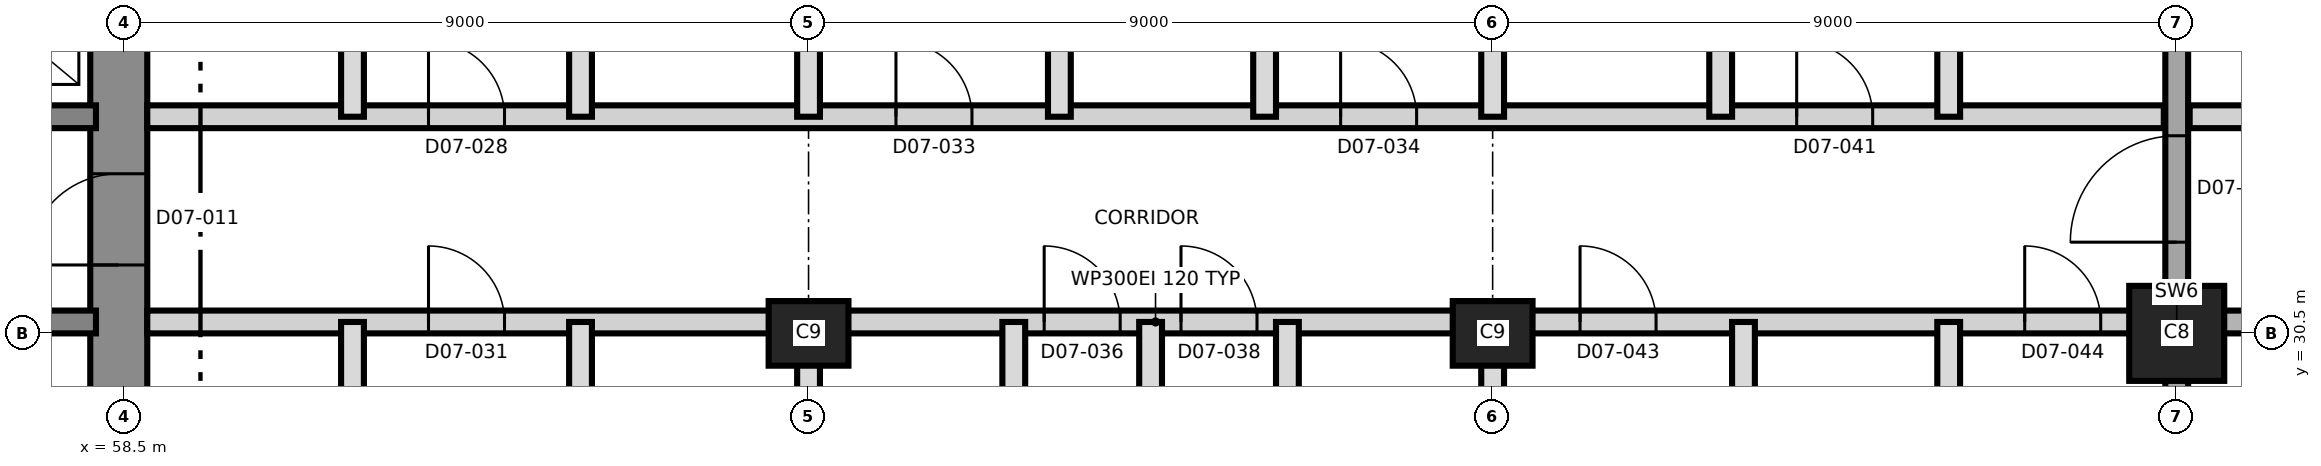
"""IFC4 building model, lengths in metres.
Left out: names, types, materials, properties, quantities, classifications, styles, units other than length and angle.
Written with IfcOpenShell. Run it as: python <this file> out.ifc"""

import sys

from ifc_helpers import new_model, si_unit, direction, frame, frame_2d, origin, origin_2d, place, context, subcontext, project, spatial, rectangle, extrude, element, fill, save


model = new_model("IFC4")
c1 = context("Model", 3, precision=1e-05, world=origin(), true_north=direction((0.0, 1.0)))
c2 = subcontext(c1, "Body", "Model", "MODEL_VIEW")
j1 = project(units=[si_unit("LENGTHUNIT", "METRE"), si_unit("PLANEANGLEUNIT", "RADIAN")], contexts=[c1])
p1 = place(None, origin())
s1 = spatial("IfcSite", under=j1, at=p1, CompositionType="ELEMENT")
p2 = place(p1, origin())
s2 = spatial("IfcBuilding", under=s1, at=p2, CompositionType="ELEMENT")
p3 = place(p2, frame((0.0, 0.0, 90.8)))
s3 = spatial("IfcBuildingStorey", under=s2, at=p3, CompositionType="ELEMENT", Elevation=90.8)
p4 = place(p3, frame((58.425, 21.125, 0.0), z_axis=(0.0, 0.0, 1.0), x_axis=(0.0, 1.0, 0.0)))
e1 = element("IfcWall", 1, at=p4, inside=s3, PredefinedType="SHEAR", context=c2, shape_type="SweptSolid", body=[
    extrude(rectangle(XDim=18.75, YDim=0.75, at=frame_2d((9.375, 0.0))), origin(), (0.0, 0.0, 1.0), 3.7),
])
p5 = place(p4, frame((10.275, 0.0, 0.0)))
e2 = element("IfcOpeningElement", 2, at=p5, cuts=e1, PredefinedType="OPENING", context=c2, shape_type="SweptSolid", body=[
    extrude(rectangle(XDim=1.2, YDim=2.1, at=frame_2d((0.6, 1.05))), frame((0.0, 0.385, 0.0), z_axis=(0.0, -1.0, 0.0), x_axis=(1.0, 0.0, 0.0)), (0.0, 0.0, 1.0), 0.77),
])
p6 = place(p3, frame((31.875, 30.65, 0.0), z_axis=(0.0, 0.0, 1.0), x_axis=(1.0, 0.0, 0.0)))
e3 = element("IfcWall", 3, at=p6, inside=s3, PredefinedType="SHEAR", context=c2, shape_type="SweptSolid", body=[
    extrude(rectangle(XDim=26.25, YDim=0.3, at=frame_2d((13.125, 0.0))), origin(), (0.0, 0.0, 1.0), 3.7),
])
p7 = place(p6, frame((24.625, 0.0, 0.0)))
e4 = element("IfcOpeningElement", 4, at=p7, cuts=e3, PredefinedType="OPENING", context=c2, shape_type="SweptSolid", body=[
    extrude(rectangle(XDim=1.0, YDim=2.1, at=frame_2d((0.5, 1.05))), frame((0.0, 0.16, 0.0), z_axis=(0.0, -1.0, 0.0), x_axis=(1.0, 0.0, 0.0)), (0.0, 0.0, 1.0), 0.32),
])
p8 = place(p6, frame((11.425, 0.0, 0.0)))
e5 = element("IfcOpeningElement", 5, at=p8, cuts=e3, PredefinedType="OPENING", context=c2, shape_type="SweptSolid", body=[
    extrude(rectangle(XDim=1.0, YDim=2.1, at=frame_2d((0.5, 1.05))), frame((0.0, 0.16, 0.0), z_axis=(0.0, -1.0, 0.0), x_axis=(1.0, 0.0, 0.0)), (0.0, 0.0, 1.0), 0.32),
])
p9 = place(p3, frame((31.875, 33.35, 0.0), z_axis=(0.0, 0.0, 1.0), x_axis=(1.0, 0.0, 0.0)))
e6 = element("IfcWall", 6, at=p9, inside=s3, PredefinedType="SHEAR", context=c2, shape_type="SweptSolid", body=[
    extrude(rectangle(XDim=26.25, YDim=0.3, at=frame_2d((13.125, 0.0))), origin(), (0.0, 0.0, 1.0), 3.7),
])
p10 = place(p9, frame((13.775, 0.0, 0.0)))
e7 = element("IfcOpeningElement", 7, at=p10, cuts=e6, PredefinedType="OPENING", context=c2, shape_type="SweptSolid", body=[
    extrude(rectangle(XDim=1.4, YDim=2.1, at=frame_2d((0.7, 1.05))), frame((0.0, 0.16, 0.0), z_axis=(0.0, -1.0, 0.0), x_axis=(1.0, 0.0, 0.0)), (0.0, 0.0, 1.0), 0.32),
])
p11 = place(p9, frame((5.25, 0.0, 0.0)))
e8 = element("IfcOpeningElement", 8, at=p11, cuts=e6, PredefinedType="OPENING", context=c2, shape_type="SweptSolid", body=[
    extrude(rectangle(XDim=1.2, YDim=2.1, at=frame_2d((0.6, 1.05))), frame((0.0, 0.16, 0.0), z_axis=(0.0, -1.0, 0.0), x_axis=(1.0, 0.0, 0.0)), (0.0, 0.0, 1.0), 0.32),
])
p12 = place(p9, frame((19.8, 0.0, 0.0)))
e9 = element("IfcOpeningElement", 9, at=p12, cuts=e6, PredefinedType="OPENING", context=c2, shape_type="SweptSolid", body=[
    extrude(rectangle(XDim=1.2, YDim=2.1, at=frame_2d((0.6, 1.05))), frame((0.0, 0.16, 0.0), z_axis=(0.0, -1.0, 0.0), x_axis=(1.0, 0.0, 0.0)), (0.0, 0.0, 1.0), 0.32),
])
for number, where, z_axis, x_axis in (
    (10, (67.5, 30.5, 0.0), (0.0, 0.0, 1.0), (1.0, 0.0, 0.0)),
    (11, (76.5, 30.5, 0.0), (0.0, 0.0, 1.0), (1.0, 0.0, 0.0)),
):
    element("IfcColumn", number, at=place(p3, frame(where, z_axis=z_axis, x_axis=x_axis)), inside=s3, PredefinedType="COLUMN", context=c2, shape_type="SweptSolid", body=[
        extrude(rectangle(XDim=1.05, YDim=0.85, at=origin_2d()), origin(), (0.0, 0.0, 1.0), 3.7),
    ])
p13 = place(p3, frame((85.5, 30.5, 0.0), z_axis=(0.0, 0.0, 1.0), x_axis=(1.0, 0.0, 0.0)))
e12 = element("IfcColumn", 12, at=p13, inside=s3, PredefinedType="COLUMN", context=c2, shape_type="SweptSolid", body=[
    extrude(rectangle(XDim=1.25, YDim=1.25, at=origin_2d()), origin(), (0.0, 0.0, 1.0), 3.7),
])
p14 = place(p3, frame((85.5, 20.995, 0.0), z_axis=(0.0, 0.0, 1.0), x_axis=(0.0, 1.0, 0.0)))
e13 = element("IfcWall", 13, at=p14, inside=s3, PredefinedType="SHEAR", context=c2, shape_type="SweptSolid", body=[
    extrude(rectangle(XDim=19.01, YDim=0.3, at=frame_2d((9.505, 0.0))), origin(), (0.0, 0.0, 1.0), 3.7),
])
p15 = place(p14, frame((10.705, 0.0, 0.0)))
e14 = element("IfcOpeningElement", 14, at=p15, cuts=e13, PredefinedType="OPENING", context=c2, shape_type="SweptSolid", body=[
    extrude(rectangle(XDim=1.4, YDim=2.1, at=frame_2d((0.7, 1.05))), frame((0.0, 0.16, 0.0), z_axis=(0.0, -1.0, 0.0), x_axis=(1.0, 0.0, 0.0)), (0.0, 0.0, 1.0), 0.32),
])
p16 = place(p3, frame((58.8, 30.65, 0.0), z_axis=(0.0, 0.0, 1.0), x_axis=(1.0, 0.0, 0.0)))
e15 = element("IfcWall", 15, at=p16, inside=s3, PredefinedType="PARTITIONING", context=c2, shape_type="SweptSolid", body=[
    extrude(rectangle(XDim=26.53, YDim=0.3, at=frame_2d((13.265, 0.0))), origin(), (0.0, 0.0, 1.0), 3.4),
])
p17 = place(p16, frame((3.7, 0.0, 0.0)))
e16 = element("IfcOpeningElement", 16, at=p17, cuts=e15, PredefinedType="OPENING", context=c2, shape_type="SweptSolid", body=[
    extrude(rectangle(XDim=1.0, YDim=2.4, at=frame_2d((0.5, 1.2))), frame((0.0, 0.16, 0.0), z_axis=(0.0, -1.0, 0.0), x_axis=(1.0, 0.0, 0.0)), (0.0, 0.0, 1.0), 0.32),
])
p18 = place(p16, frame((11.8, 0.0, 0.0)))
e17 = element("IfcOpeningElement", 17, at=p18, cuts=e15, PredefinedType="OPENING", context=c2, shape_type="SweptSolid", body=[
    extrude(rectangle(XDim=1.0, YDim=2.1, at=frame_2d((0.5, 1.05))), frame((0.0, 0.16, 0.0), z_axis=(0.0, -1.0, 0.0), x_axis=(1.0, 0.0, 0.0)), (0.0, 0.0, 1.0), 0.32),
])
p19 = place(p16, frame((13.6, 0.0, 0.0)))
e18 = element("IfcOpeningElement", 18, at=p19, cuts=e15, PredefinedType="OPENING", context=c2, shape_type="SweptSolid", body=[
    extrude(rectangle(XDim=1.0, YDim=2.1, at=frame_2d((0.5, 1.05))), frame((0.0, 0.16, 0.0), z_axis=(0.0, -1.0, 0.0), x_axis=(1.0, 0.0, 0.0)), (0.0, 0.0, 1.0), 0.32),
])
p20 = place(p16, frame((18.85, 0.0, 0.0)))
e19 = element("IfcOpeningElement", 19, at=p20, cuts=e15, PredefinedType="OPENING", context=c2, shape_type="SweptSolid", body=[
    extrude(rectangle(XDim=1.0, YDim=2.1, at=frame_2d((0.5, 1.05))), frame((0.0, 0.16, 0.0), z_axis=(0.0, -1.0, 0.0), x_axis=(1.0, 0.0, 0.0)), (0.0, 0.0, 1.0), 0.32),
])
p21 = place(p16, frame((24.7, 0.0, 0.0)))
e20 = element("IfcOpeningElement", 20, at=p21, cuts=e15, PredefinedType="OPENING", context=c2, shape_type="SweptSolid", body=[
    extrude(rectangle(XDim=1.0, YDim=2.1, at=frame_2d((0.5, 1.05))), frame((0.0, 0.16, 0.0), z_axis=(0.0, -1.0, 0.0), x_axis=(1.0, 0.0, 0.0)), (0.0, 0.0, 1.0), 0.32),
])
p22 = place(p3, frame((85.67, 30.65, 0.0), z_axis=(0.0, 0.0, 1.0), x_axis=(1.0, 0.0, 0.0)))
e21 = element("IfcWall", 21, at=p22, inside=s3, PredefinedType="SHEAR", context=c2, shape_type="SweptSolid", body=[
    extrude(rectangle(XDim=9.335, YDim=0.3, at=frame_2d((4.667, 0.0))), origin(), (0.0, 0.0, 1.0), 3.4),
])
p23 = place(p22, frame((2.08, 0.0, 0.0)))
e22 = element("IfcOpeningElement", 22, at=p23, cuts=e21, PredefinedType="OPENING", context=c2, shape_type="SweptSolid", body=[
    extrude(rectangle(XDim=1.2, YDim=2.1, at=frame_2d((0.6, 1.05))), frame((0.0, 0.16, 0.0), z_axis=(0.0, -1.0, 0.0), x_axis=(1.0, 0.0, 0.0)), (0.0, 0.0, 1.0), 0.32),
])
p24 = place(p22, frame((5.63, 0.0, 0.0)))
e23 = element("IfcOpeningElement", 23, at=p24, cuts=e21, PredefinedType="OPENING", context=c2, shape_type="SweptSolid", body=[
    extrude(rectangle(XDim=1.0, YDim=2.1, at=frame_2d((0.5, 1.05))), frame((0.0, 0.16, 0.0), z_axis=(0.0, -1.0, 0.0), x_axis=(1.0, 0.0, 0.0)), (0.0, 0.0, 1.0), 0.32),
])
p25 = place(p3, frame((58.8, 33.35, 0.0), z_axis=(0.0, 0.0, 1.0), x_axis=(1.0, 0.0, 0.0)))
e24 = element("IfcWall", 24, at=p25, inside=s3, PredefinedType="PARTITIONING", context=c2, shape_type="SweptSolid", body=[
    extrude(rectangle(XDim=26.53, YDim=0.3, at=frame_2d((13.265, 0.0))), origin(), (0.0, 0.0, 1.0), 3.4),
])
p26 = place(p25, frame((3.7, 0.0, 0.0)))
e25 = element("IfcOpeningElement", 25, at=p26, cuts=e24, PredefinedType="OPENING", context=c2, shape_type="SweptSolid", body=[
    extrude(rectangle(XDim=1.0, YDim=2.4, at=frame_2d((0.5, 1.2))), frame((0.0, 0.16, 0.0), z_axis=(0.0, -1.0, 0.0), x_axis=(1.0, 0.0, 0.0)), (0.0, 0.0, 1.0), 0.32),
])
p27 = place(p25, frame((9.85, 0.0, 0.0)))
e26 = element("IfcOpeningElement", 26, at=p27, cuts=e24, PredefinedType="OPENING", context=c2, shape_type="SweptSolid", body=[
    extrude(rectangle(XDim=1.0, YDim=2.1, at=frame_2d((0.5, 1.05))), frame((0.0, 0.16, 0.0), z_axis=(0.0, -1.0, 0.0), x_axis=(1.0, 0.0, 0.0)), (0.0, 0.0, 1.0), 0.32),
])
p28 = place(p25, frame((15.7, 0.0, 0.0)))
e27 = element("IfcOpeningElement", 27, at=p28, cuts=e24, PredefinedType="OPENING", context=c2, shape_type="SweptSolid", body=[
    extrude(rectangle(XDim=1.0, YDim=2.1, at=frame_2d((0.5, 1.05))), frame((0.0, 0.16, 0.0), z_axis=(0.0, -1.0, 0.0), x_axis=(1.0, 0.0, 0.0)), (0.0, 0.0, 1.0), 0.32),
])
p29 = place(p25, frame((21.7, 0.0, 0.0)))
e28 = element("IfcOpeningElement", 28, at=p29, cuts=e24, PredefinedType="OPENING", context=c2, shape_type="SweptSolid", body=[
    extrude(rectangle(XDim=1.0, YDim=2.4, at=frame_2d((0.5, 1.2))), frame((0.0, 0.16, 0.0), z_axis=(0.0, -1.0, 0.0), x_axis=(1.0, 0.0, 0.0)), (0.0, 0.0, 1.0), 0.32),
])
p30 = place(p3, frame((85.67, 33.35, 0.0), z_axis=(0.0, 0.0, 1.0), x_axis=(1.0, 0.0, 0.0)))
e29 = element("IfcWall", 29, at=p30, inside=s3, PredefinedType="PARTITIONING", context=c2, shape_type="SweptSolid", body=[
    extrude(rectangle(XDim=9.237, YDim=0.3, at=frame_2d((4.619, 0.0))), origin(), (0.0, 0.0, 1.0), 3.4),
])
p31 = place(p30, frame((1.83, 0.0, 0.0)))
e30 = element("IfcOpeningElement", 30, at=p31, cuts=e29, PredefinedType="OPENING", context=c2, shape_type="SweptSolid", body=[
    extrude(rectangle(XDim=1.0, YDim=2.1, at=frame_2d((0.5, 1.05))), frame((0.0, 0.16, 0.0), z_axis=(0.0, -1.0, 0.0), x_axis=(1.0, 0.0, 0.0)), (0.0, 0.0, 1.0), 0.32),
])
p32 = place(p30, frame((5.63, 0.0, 0.0)))
e31 = element("IfcOpeningElement", 31, at=p32, cuts=e29, PredefinedType="OPENING", context=c2, shape_type="SweptSolid", body=[
    extrude(rectangle(XDim=1.0, YDim=2.1, at=frame_2d((0.5, 1.05))), frame((0.0, 0.16, 0.0), z_axis=(0.0, -1.0, 0.0), x_axis=(1.0, 0.0, 0.0)), (0.0, 0.0, 1.0), 0.32),
])
for number, where, z_axis, x_axis in (
    (32, (61.5, 27.35, 0.0), (0.0, 0.0, 1.0), (0.0, 1.0, 0.0)),
    (33, (61.5, 33.35, 0.0), (0.0, 0.0, 1.0), (0.0, 1.0, 0.0)),
    (34, (64.5, 27.35, 0.0), (0.0, 0.0, 1.0), (0.0, 1.0, 0.0)),
    (35, (64.5, 33.35, 0.0), (0.0, 0.0, 1.0), (0.0, 1.0, 0.0)),
):
    element("IfcWall", number, at=place(p3, frame(where, z_axis=z_axis, x_axis=x_axis)), inside=s3, PredefinedType="PARTITIONING", context=c2, shape_type="SweptSolid", body=[
        extrude(rectangle(XDim=3.3, YDim=0.3, at=frame_2d((1.65, 0.0))), origin(), (0.0, 0.0, 1.0), 3.4),
    ])
p33 = place(p3, frame((67.5, 20.995, 0.0), z_axis=(0.0, 0.0, 1.0), x_axis=(0.0, 1.0, 0.0)))
e36 = element("IfcWall", 36, at=p33, inside=s3, PredefinedType="PARTITIONING", context=c2, shape_type="SweptSolid", body=[
    extrude(rectangle(XDim=9.655, YDim=0.3, at=frame_2d((4.827, 0.0))), origin(), (0.0, 0.0, 1.0), 3.4),
])
p34 = place(p3, frame((67.5, 33.35, 0.0), z_axis=(0.0, 0.0, 1.0), x_axis=(0.0, 1.0, 0.0)))
e37 = element("IfcWall", 37, at=p34, inside=s3, PredefinedType="PARTITIONING", context=c2, shape_type="SweptSolid", body=[
    extrude(rectangle(XDim=6.655, YDim=0.3, at=frame_2d((3.327, 0.0))), origin(), (0.0, 0.0, 1.0), 3.4),
])
for number, where, z_axis, x_axis in (
    (38, (70.2, 27.45, 0.0), (0.0, 0.0, 1.0), (0.0, 1.0, 0.0)),
    (39, (70.8, 33.35, 0.0), (0.0, 0.0, 1.0), (0.0, 1.0, 0.0)),
):
    element("IfcWall", number, at=place(p3, frame(where, z_axis=z_axis, x_axis=x_axis)), inside=s3, PredefinedType="PARTITIONING", context=c2, shape_type="SweptSolid", body=[
        extrude(rectangle(XDim=3.2, YDim=0.3, at=frame_2d((1.6, 0.0))), origin(), (0.0, 0.0, 1.0), 3.4),
    ])
p35 = place(p3, frame((72.0, 20.995, 0.0), z_axis=(0.0, 0.0, 1.0), x_axis=(0.0, 1.0, 0.0)))
e40 = element("IfcWall", 40, at=p35, inside=s3, PredefinedType="PARTITIONING", context=c2, shape_type="SweptSolid", body=[
    extrude(rectangle(XDim=9.655, YDim=0.3, at=frame_2d((4.827, 0.0))), origin(), (0.0, 0.0, 1.0), 3.4),
])
p36 = place(p3, frame((73.5, 33.35, 0.0), z_axis=(0.0, 0.0, 1.0), x_axis=(0.0, 1.0, 0.0)))
e41 = element("IfcWall", 41, at=p36, inside=s3, PredefinedType="PARTITIONING", context=c2, shape_type="SweptSolid", body=[
    extrude(rectangle(XDim=6.795, YDim=0.3, at=frame_2d((3.397, 0.0))), origin(), (0.0, 0.0, 1.0), 3.4),
])
p37 = place(p3, frame((73.8, 27.45, 0.0), z_axis=(0.0, 0.0, 1.0), x_axis=(0.0, 1.0, 0.0)))
e42 = element("IfcWall", 42, at=p37, inside=s3, PredefinedType="PARTITIONING", context=c2, shape_type="SweptSolid", body=[
    extrude(rectangle(XDim=3.2, YDim=0.3, at=frame_2d((1.6, 0.0))), origin(), (0.0, 0.0, 1.0), 3.4),
])
p38 = place(p3, frame((76.5, 20.995, 0.0), z_axis=(0.0, 0.0, 1.0), x_axis=(0.0, 1.0, 0.0)))
e43 = element("IfcWall", 43, at=p38, inside=s3, PredefinedType="PARTITIONING", context=c2, shape_type="SweptSolid", body=[
    extrude(rectangle(XDim=9.655, YDim=0.3, at=frame_2d((4.827, 0.0))), origin(), (0.0, 0.0, 1.0), 3.4),
])
p39 = place(p3, frame((76.5, 33.35, 0.0), z_axis=(0.0, 0.0, 1.0), x_axis=(0.0, 1.0, 0.0)))
e44 = element("IfcWall", 44, at=p39, inside=s3, PredefinedType="PARTITIONING", context=c2, shape_type="SweptSolid", body=[
    extrude(rectangle(XDim=6.655, YDim=0.3, at=frame_2d((3.327, 0.0))), origin(), (0.0, 0.0, 1.0), 3.4),
])
p40 = place(p3, frame((79.5, 33.35, 0.0), z_axis=(0.0, 0.0, 1.0), x_axis=(0.0, 1.0, 0.0)))
e45 = element("IfcWall", 45, at=p40, inside=s3, PredefinedType="PARTITIONING", context=c2, shape_type="SweptSolid", body=[
    extrude(rectangle(XDim=3.3, YDim=0.3, at=frame_2d((1.65, 0.0))), origin(), (0.0, 0.0, 1.0), 3.4),
])
p41 = place(p3, frame((79.8, 27.45, 0.0), z_axis=(0.0, 0.0, 1.0), x_axis=(0.0, 1.0, 0.0)))
e46 = element("IfcWall", 46, at=p41, inside=s3, PredefinedType="PARTITIONING", context=c2, shape_type="SweptSolid", body=[
    extrude(rectangle(XDim=3.2, YDim=0.3, at=frame_2d((1.6, 0.0))), origin(), (0.0, 0.0, 1.0), 3.4),
])
p42 = place(p3, frame((82.5, 20.995, 0.0), z_axis=(0.0, 0.0, 1.0), x_axis=(0.0, 1.0, 0.0)))
e47 = element("IfcWall", 47, at=p42, inside=s3, PredefinedType="PARTITIONING", context=c2, shape_type="SweptSolid", body=[
    extrude(rectangle(XDim=9.655, YDim=0.3, at=frame_2d((4.827, 0.0))), origin(), (0.0, 0.0, 1.0), 3.4),
])
p43 = place(p3, frame((82.5, 33.35, 0.0), z_axis=(0.0, 0.0, 1.0), x_axis=(0.0, 1.0, 0.0)))
e48 = element("IfcWall", 48, at=p43, inside=s3, PredefinedType="PARTITIONING", context=c2, shape_type="SweptSolid", body=[
    extrude(rectangle(XDim=3.3, YDim=0.3, at=frame_2d((1.65, 0.0))), origin(), (0.0, 0.0, 1.0), 3.4),
])
p44 = place(p5, origin())
e49 = element("IfcDoor", 49, at=p44, inside=s3, OperationType="SINGLE_SWING_LEFT", PredefinedType="DOOR", context=c2, shape_type="SweptSolid", body=[
    extrude(rectangle(XDim=1.2, YDim=2.1, at=frame_2d((0.6, 1.05))), frame((0.0, 0.025, 0.0), z_axis=(0.0, -1.0, 0.0), x_axis=(1.0, 0.0, 0.0)), (0.0, 0.0, 1.0), 0.05),
])
fill(e2, e49)
p45 = place(p26, origin())
e50 = element("IfcDoor", 50, at=p45, inside=s3, OperationType="SINGLE_SWING_LEFT", PredefinedType="DOOR", context=c2, shape_type="SweptSolid", body=[
    extrude(rectangle(XDim=1.0, YDim=2.4, at=frame_2d((0.5, 1.2))), frame((0.0, 0.025, 0.0), z_axis=(0.0, -1.0, 0.0), x_axis=(1.0, 0.0, 0.0)), (0.0, 0.0, 1.0), 0.05),
])
fill(e25, e50)
p46 = place(p17, origin())
e51 = element("IfcDoor", 51, at=p46, inside=s3, OperationType="SINGLE_SWING_LEFT", PredefinedType="DOOR", context=c2, shape_type="SweptSolid", body=[
    extrude(rectangle(XDim=1.0, YDim=2.4, at=frame_2d((0.5, 1.2))), frame((0.0, 0.025, 0.0), z_axis=(0.0, -1.0, 0.0), x_axis=(1.0, 0.0, 0.0)), (0.0, 0.0, 1.0), 0.05),
])
fill(e16, e51)
p47 = place(p27, origin())
e52 = element("IfcDoor", 52, at=p47, inside=s3, OperationType="SINGLE_SWING_LEFT", PredefinedType="DOOR", context=c2, shape_type="SweptSolid", body=[
    extrude(rectangle(XDim=1.0, YDim=2.1, at=frame_2d((0.5, 1.05))), frame((0.0, 0.025, 0.0), z_axis=(0.0, -1.0, 0.0), x_axis=(1.0, 0.0, 0.0)), (0.0, 0.0, 1.0), 0.05),
])
fill(e26, e52)
p48 = place(p28, origin())
e53 = element("IfcDoor", 53, at=p48, inside=s3, OperationType="SINGLE_SWING_RIGHT", PredefinedType="DOOR", context=c2, shape_type="SweptSolid", body=[
    extrude(rectangle(XDim=1.0, YDim=2.1, at=frame_2d((0.5, 1.05))), frame((0.0, 0.025, 0.0), z_axis=(0.0, -1.0, 0.0), x_axis=(1.0, 0.0, 0.0)), (0.0, 0.0, 1.0), 0.05),
])
fill(e27, e53)
p49 = place(p18, origin())
e54 = element("IfcDoor", 54, at=p49, inside=s3, OperationType="SINGLE_SWING_LEFT", PredefinedType="DOOR", context=c2, shape_type="SweptSolid", body=[
    extrude(rectangle(XDim=1.0, YDim=2.1, at=frame_2d((0.5, 1.05))), frame((0.0, 0.025, 0.0), z_axis=(0.0, -1.0, 0.0), x_axis=(1.0, 0.0, 0.0)), (0.0, 0.0, 1.0), 0.05),
])
fill(e17, e54)
p50 = place(p19, origin())
e55 = element("IfcDoor", 55, at=p50, inside=s3, OperationType="SINGLE_SWING_RIGHT", PredefinedType="DOOR", context=c2, shape_type="SweptSolid", body=[
    extrude(rectangle(XDim=1.0, YDim=2.1, at=frame_2d((0.5, 1.05))), frame((0.0, 0.025, 0.0), z_axis=(0.0, -1.0, 0.0), x_axis=(1.0, 0.0, 0.0)), (0.0, 0.0, 1.0), 0.05),
])
fill(e18, e55)
p51 = place(p29, origin())
e56 = element("IfcDoor", 56, at=p51, inside=s3, OperationType="SINGLE_SWING_LEFT", PredefinedType="DOOR", context=c2, shape_type="SweptSolid", body=[
    extrude(rectangle(XDim=1.0, YDim=2.4, at=frame_2d((0.5, 1.2))), frame((0.0, 0.025, 0.0), z_axis=(0.0, -1.0, 0.0), x_axis=(1.0, 0.0, 0.0)), (0.0, 0.0, 1.0), 0.05),
])
fill(e28, e56)
p52 = place(p20, origin())
e57 = element("IfcDoor", 57, at=p52, inside=s3, OperationType="SINGLE_SWING_LEFT", PredefinedType="DOOR", context=c2, shape_type="SweptSolid", body=[
    extrude(rectangle(XDim=1.0, YDim=2.1, at=frame_2d((0.5, 1.05))), frame((0.0, 0.025, 0.0), z_axis=(0.0, -1.0, 0.0), x_axis=(1.0, 0.0, 0.0)), (0.0, 0.0, 1.0), 0.05),
])
fill(e19, e57)
p53 = place(p21, origin())
e58 = element("IfcDoor", 58, at=p53, inside=s3, OperationType="SINGLE_SWING_LEFT", PredefinedType="DOOR", context=c2, shape_type="SweptSolid", body=[
    extrude(rectangle(XDim=1.0, YDim=2.1, at=frame_2d((0.5, 1.05))), frame((0.0, 0.025, 0.0), z_axis=(0.0, -1.0, 0.0), x_axis=(1.0, 0.0, 0.0)), (0.0, 0.0, 1.0), 0.05),
])
fill(e20, e58)
p54 = place(p15, origin())
e59 = element("IfcDoor", 59, at=p54, inside=s3, OperationType="SINGLE_SWING_RIGHT", PredefinedType="DOOR", context=c2, shape_type="SweptSolid", body=[
    extrude(rectangle(XDim=1.4, YDim=2.1, at=frame_2d((0.7, 1.05))), frame((0.0, 0.025, 0.0), z_axis=(0.0, -1.0, 0.0), x_axis=(1.0, 0.0, 0.0)), (0.0, 0.0, 1.0), 0.05),
])
fill(e14, e59)
save(model, sys.argv[1])
